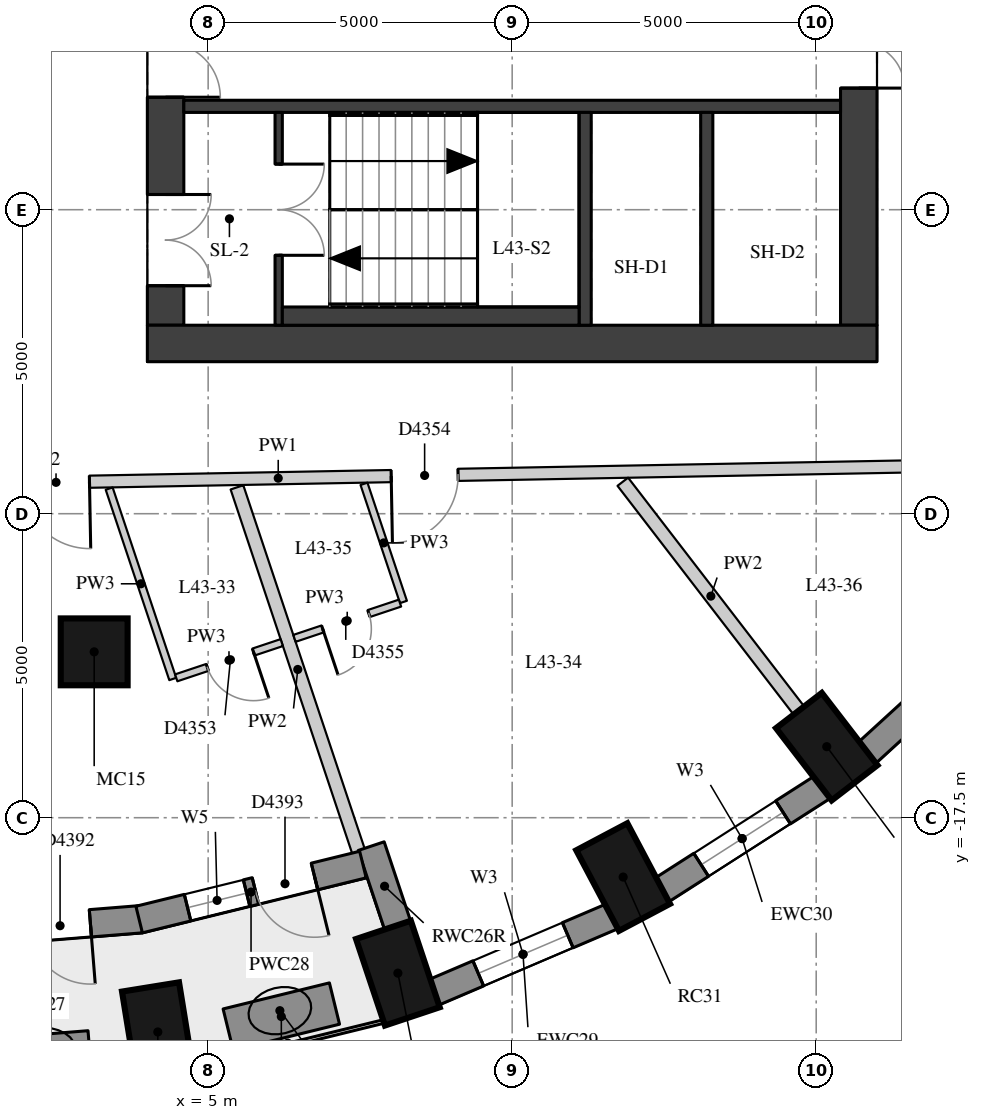
"""IFC4 building model, lengths in metres.
Left out: names, types, materials, properties, quantities, classifications, styles, units other than length and angle.
Written with IfcOpenShell. Run it as: python <this file> out.ifc"""

import sys

from ifc_helpers import new_model, si_unit, direction, frame, frame_2d, origin, origin_2d, place, context, subcontext, project, spatial, rectangle, extrude, element, fill, save


model = new_model("IFC4")
c1 = context("Model", 3, precision=1e-05, world=origin(), true_north=direction((0.0, 1.0)))
c2 = subcontext(c1, "Body", "Model", "MODEL_VIEW")
j1 = project(units=[si_unit("LENGTHUNIT", "METRE"), si_unit("PLANEANGLEUNIT", "RADIAN")], contexts=[c1])
p1 = place(None, origin())
s1 = spatial("IfcSite", under=j1, at=p1, CompositionType="ELEMENT")
p2 = place(p1, origin())
s2 = spatial("IfcBuilding", under=s1, at=p2, CompositionType="ELEMENT")
p3 = place(p2, frame((0.0, 0.0, 155.0)))
s3 = spatial("IfcBuildingStorey", under=s2, at=p3, CompositionType="ELEMENT", Elevation=155.0)
for number, where, z_axis, x_axis in (
    (1, (4.172, -21.024, 0.0), (0.0, 0.0, 1.0), (0.16, -0.987, 0.0)),
    (2, (8.12, -20.056, 0.0), (0.0, 0.0, 1.0), (0.317, -0.949, 0.0)),
    (3, (11.825, -18.476, 0.0), (0.0, 0.0, 1.0), (0.468, -0.884, 0.0)),
    (4, (15.173, -16.332, 0.0), (0.0, 0.0, 1.0), (0.61, -0.792, 0.0)),
):
    element("IfcColumn", number, at=place(p3, frame(where, z_axis=z_axis, x_axis=x_axis)), inside=s3, PredefinedType="COLUMN", context=c2, shape_type="SweptSolid", body=[
        extrude(rectangle(XDim=1.5, YDim=0.95, at=origin_2d()), origin(), (0.0, 0.0, 1.0), 3.3),
    ])
p4 = place(p3, frame((3.126, -14.772, 0.0), z_axis=(0.0, 0.0, 1.0), x_axis=(1.0, 0.0, 0.0)))
e5 = element("IfcColumn", 5, at=p4, inside=s3, PredefinedType="COLUMN", context=c2, shape_type="SweptSolid", body=[
    extrude(rectangle(XDim=1.1, YDim=1.1, at=origin_2d()), origin(), (0.0, 0.0, 1.0), 3.3),
])
p5 = place(p3, frame((8.706, -20.375, 0.0), z_axis=(0.0, 0.0, 1.0), x_axis=(0.91981046949, 0.392362969986, 0.0)))
e6 = element("IfcWall", 6, at=p5, inside=s3, PredefinedType="SOLIDWALL", context=c2, shape_type="SweptSolid", body=[
    extrude(rectangle(XDim=3.201, YDim=0.45, at=frame_2d((1.6, 0.0))), origin(), (0.0, 0.0, 1.0), 3.02),
])
p6 = place(p5, frame((0.8, 0.0, 0.4)))
e7 = element("IfcOpeningElement", 7, at=p6, cuts=e6, PredefinedType="OPENING", context=c2, shape_type="SweptSolid", body=[
    extrude(rectangle(XDim=1.6, YDim=1.75, at=frame_2d((0.8, 0.875))), frame((0.0, 0.235, 0.0), z_axis=(0.0, -1.0, 0.0), x_axis=(1.0, 0.0, 0.0)), (0.0, 0.0, 1.0), 0.47),
])
p7 = place(p3, frame((12.455, -18.693, 0.0), z_axis=(0.0, 0.0, 1.0), x_axis=(0.842065914439, 0.539374633943, 0.0)))
e8 = element("IfcWall", 8, at=p7, inside=s3, PredefinedType="SOLIDWALL", context=c2, shape_type="SweptSolid", body=[
    extrude(rectangle(XDim=3.151, YDim=0.45, at=frame_2d((1.576, 0.0))), origin(), (0.0, 0.0, 1.0), 3.02),
])
p8 = place(p7, frame((0.776, 0.0, 0.4)))
e9 = element("IfcOpeningElement", 9, at=p8, cuts=e8, PredefinedType="OPENING", context=c2, shape_type="SweptSolid", body=[
    extrude(rectangle(XDim=1.6, YDim=1.75, at=frame_2d((0.8, 0.875))), frame((0.0, 0.235, 0.0), z_axis=(0.0, -1.0, 0.0), x_axis=(1.0, 0.0, 0.0)), (0.0, 0.0, 1.0), 0.47),
])
p9 = place(p3, frame((15.83, -16.439, 0.0), z_axis=(0.0, 0.0, 1.0), x_axis=(0.737808755941, 0.675009807082, 0.0)))
e10 = element("IfcWall", 10, at=p9, inside=s3, PredefinedType="SOLIDWALL", context=c2, shape_type="SweptSolid", body=[
    extrude(rectangle(XDim=3.094, YDim=0.45, at=frame_2d((1.547, 0.0))), origin(), (0.0, 0.0, 1.0), 3.02),
])
p10 = place(p3, frame((8.122, -19.286, 0.0), z_axis=(0.0, 0.0, 1.0), x_axis=(-0.316649231286, 0.948542705589, 0.0)))
e11 = element("IfcWall", 11, at=p10, inside=s3, PredefinedType="SOLIDWALL", context=c2, shape_type="SweptSolid", body=[
    extrude(rectangle(XDim=1.39, YDim=0.45, at=frame_2d((0.695, 0.0))), origin(), (0.0, 0.0, 1.0), 3.02),
])
p11 = place(p3, frame((0.082, -19.476, 0.0), z_axis=(0.0, 0.0, 1.0), x_axis=(0.996792139022, 0.080033940204, 0.0)))
e12 = element("IfcWall", 12, at=p11, inside=s3, PredefinedType="SOLIDWALL", context=c2, shape_type="SweptSolid", body=[
    extrude(rectangle(XDim=3.831, YDim=0.45, at=frame_2d((1.916, 0.0))), origin(), (0.0, 0.0, 1.0), 3.02),
])
p12 = place(p11, frame((0.841, 0.0, 0.4)))
e13 = element("IfcOpeningElement", 13, at=p12, cuts=e12, PredefinedType="OPENING", context=c2, shape_type="SweptSolid", body=[
    extrude(rectangle(XDim=1.0, YDim=1.75, at=frame_2d((0.5, 0.875))), frame((0.0, 0.235, 0.0), z_axis=(0.0, -1.0, 0.0), x_axis=(1.0, 0.0, 0.0)), (0.0, 0.0, 1.0), 0.47),
])
p13 = place(p11, frame((1.991, 0.0, 0.0)))
e14 = element("IfcOpeningElement", 14, at=p13, cuts=e12, PredefinedType="OPENING", context=c2, shape_type="SweptSolid", body=[
    extrude(rectangle(XDim=1.0, YDim=2.15, at=frame_2d((0.5, 1.075))), frame((0.0, 0.235, 0.0), z_axis=(0.0, -1.0, 0.0), x_axis=(1.0, 0.0, 0.0)), (0.0, 0.0, 1.0), 0.47),
])
p14 = place(p3, frame((3.865, -19.175, 0.0), z_axis=(0.0, 0.0, 1.0), x_axis=(0.97109740077, 0.238683552465, 0.0)))
e15 = element("IfcWall", 15, at=p14, inside=s3, PredefinedType="SOLIDWALL", context=c2, shape_type="SweptSolid", body=[
    extrude(rectangle(XDim=3.79, YDim=0.45, at=frame_2d((1.895, 0.0))), origin(), (0.0, 0.0, 1.0), 3.02),
])
p15 = place(p14, frame((0.82, 0.0, 0.4)))
e16 = element("IfcOpeningElement", 16, at=p15, cuts=e15, PredefinedType="OPENING", context=c2, shape_type="SweptSolid", body=[
    extrude(rectangle(XDim=1.0, YDim=1.75, at=frame_2d((0.5, 0.875))), frame((0.0, 0.235, 0.0), z_axis=(0.0, -1.0, 0.0), x_axis=(1.0, 0.0, 0.0)), (0.0, 0.0, 1.0), 0.47),
])
p16 = place(p14, frame((1.97, 0.0, 0.0)))
e17 = element("IfcOpeningElement", 17, at=p16, cuts=e15, PredefinedType="OPENING", context=c2, shape_type="SweptSolid", body=[
    extrude(rectangle(XDim=1.0, YDim=2.15, at=frame_2d((0.5, 1.075))), frame((0.0, 0.235, 0.0), z_axis=(0.0, -1.0, 0.0), x_axis=(1.0, 0.0, 0.0)), (0.0, 0.0, 1.0), 0.47),
])
for number, where, z_axis, x_axis in (
    (18, (1.258, -21.496, 0.0), (0.0, 0.0, 1.0), (0.997, 0.08, 0.0)),
    (19, (5.329, -20.985, 0.0), (0.0, 0.0, 1.0), (0.971, 0.238, 0.0)),
):
    element("IfcWall", number, at=place(p3, frame(where, z_axis=z_axis, x_axis=x_axis)), inside=s3, PredefinedType="USERDEFINED", context=c2, shape_type="SweptSolid", body=[
        extrude(rectangle(XDim=1.8, YDim=0.7, at=frame_2d((0.9, 0.0))), origin(), (0.0, 0.0, 1.0), 0.75),
    ])
p17 = place(p3, frame((4.3, -9.4, 0.0), z_axis=(0.0, 0.0, 1.0), x_axis=(0.0, 1.0, 0.0)))
e20 = element("IfcWall", 20, at=p17, inside=s3, PredefinedType="SHEAR", context=c2, shape_type="SweptSolid", body=[
    extrude(rectangle(XDim=18.8, YDim=0.6, at=frame_2d((9.4, 0.0))), origin(), (0.0, 0.0, 1.0), 3.02),
])
p18 = place(p17, frame((0.65, 0.0, 0.0)))
e21 = element("IfcOpeningElement", 21, at=p18, cuts=e20, PredefinedType="OPENING", context=c2, shape_type="SweptSolid", body=[
    extrude(rectangle(XDim=1.5, YDim=2.1, at=frame_2d((0.75, 1.05))), frame((0.0, 0.31, 0.0), z_axis=(0.0, -1.0, 0.0), x_axis=(1.0, 0.0, 0.0)), (0.0, 0.0, 1.0), 0.62),
])
p19 = place(p17, frame((3.75, 0.0, 0.0)))
e22 = element("IfcOpeningElement", 22, at=p19, cuts=e20, PredefinedType="OPENING", context=c2, shape_type="SweptSolid", body=[
    extrude(rectangle(XDim=1.8, YDim=2.1, at=frame_2d((0.9, 1.05))), frame((0.0, 0.31, 0.0), z_axis=(0.0, -1.0, 0.0), x_axis=(1.0, 0.0, 0.0)), (0.0, 0.0, 1.0), 0.62),
])
p20 = place(p17, frame((6.25, 0.0, 0.0)))
e23 = element("IfcOpeningElement", 23, at=p20, cuts=e20, PredefinedType="OPENING", context=c2, shape_type="SweptSolid", body=[
    extrude(rectangle(XDim=1.1, YDim=2.1, at=frame_2d((0.55, 1.05))), frame((0.0, 0.31, 0.0), z_axis=(0.0, -1.0, 0.0), x_axis=(1.0, 0.0, 0.0)), (0.0, 0.0, 1.0), 0.62),
])
p21 = place(p17, frame((8.9, 0.0, 0.0)))
e24 = element("IfcOpeningElement", 24, at=p21, cuts=e20, PredefinedType="OPENING", context=c2, shape_type="SweptSolid", body=[
    extrude(rectangle(XDim=1.0, YDim=2.1, at=frame_2d((0.5, 1.05))), frame((0.0, 0.31, 0.0), z_axis=(0.0, -1.0, 0.0), x_axis=(1.0, 0.0, 0.0)), (0.0, 0.0, 1.0), 0.62),
])
p22 = place(p17, frame((11.45, 0.0, 0.0)))
e25 = element("IfcOpeningElement", 25, at=p22, cuts=e20, PredefinedType="OPENING", context=c2, shape_type="SweptSolid", body=[
    extrude(rectangle(XDim=1.1, YDim=2.1, at=frame_2d((0.55, 1.05))), frame((0.0, 0.31, 0.0), z_axis=(0.0, -1.0, 0.0), x_axis=(1.0, 0.0, 0.0)), (0.0, 0.0, 1.0), 0.62),
])
p23 = place(p17, frame((13.25, 0.0, 0.0)))
e26 = element("IfcOpeningElement", 26, at=p23, cuts=e20, PredefinedType="OPENING", context=c2, shape_type="SweptSolid", body=[
    extrude(rectangle(XDim=1.8, YDim=2.1, at=frame_2d((0.9, 1.05))), frame((0.0, 0.31, 0.0), z_axis=(0.0, -1.0, 0.0), x_axis=(1.0, 0.0, 0.0)), (0.0, 0.0, 1.0), 0.62),
])
p24 = place(p17, frame((16.65, 0.0, 0.0)))
e27 = element("IfcOpeningElement", 27, at=p24, cuts=e20, PredefinedType="OPENING", context=c2, shape_type="SweptSolid", body=[
    extrude(rectangle(XDim=1.5, YDim=2.1, at=frame_2d((0.75, 1.05))), frame((0.0, 0.31, 0.0), z_axis=(0.0, -1.0, 0.0), x_axis=(1.0, 0.0, 0.0)), (0.0, 0.0, 1.0), 0.62),
])
p25 = place(p3, frame((15.7, -9.4, 0.0), z_axis=(0.0, 0.0, 1.0), x_axis=(0.0, 1.0, 0.0)))
e28 = element("IfcWall", 28, at=p25, inside=s3, PredefinedType="SHEAR", context=c2, shape_type="SweptSolid", body=[
    extrude(rectangle(XDim=18.8, YDim=0.6, at=frame_2d((9.4, 0.0))), origin(), (0.0, 0.0, 1.0), 3.02),
])
p26 = place(p25, frame((13.4, 0.0, 0.0)))
e29 = element("IfcOpeningElement", 29, at=p26, cuts=e28, PredefinedType="OPENING", context=c2, shape_type="SweptSolid", body=[
    extrude(rectangle(XDim=1.5, YDim=2.1, at=frame_2d((0.75, 1.05))), frame((0.0, 0.31, 0.0), z_axis=(0.0, -1.0, 0.0), x_axis=(1.0, 0.0, 0.0)), (0.0, 0.0, 1.0), 0.62),
])
p27 = place(p25, frame((3.9, 0.0, 0.0)))
e30 = element("IfcOpeningElement", 30, at=p27, cuts=e28, PredefinedType="OPENING", context=c2, shape_type="SweptSolid", body=[
    extrude(rectangle(XDim=1.5, YDim=2.1, at=frame_2d((0.75, 1.05))), frame((0.0, 0.31, 0.0), z_axis=(0.0, -1.0, 0.0), x_axis=(1.0, 0.0, 0.0)), (0.0, 0.0, 1.0), 0.62),
])
p28 = place(p3, frame((4.0, -9.7, 0.0), z_axis=(0.0, 0.0, 1.0), x_axis=(1.0, 0.0, 0.0)))
e31 = element("IfcWall", 31, at=p28, inside=s3, PredefinedType="SHEAR", context=c2, shape_type="SweptSolid", body=[
    extrude(rectangle(XDim=12.0, YDim=0.6, at=frame_2d((6.0, 0.0))), origin(), (0.0, 0.0, 1.0), 3.02),
])
p29 = place(p3, frame((4.6, -5.8, 0.0), z_axis=(0.0, 0.0, 1.0), x_axis=(1.0, 0.0, 0.0)))
e32 = element("IfcWall", 32, at=p29, inside=s3, PredefinedType="SHEAR", context=c2, shape_type="SweptSolid", body=[
    extrude(rectangle(XDim=10.8, YDim=0.2, at=frame_2d((5.4, 0.0))), origin(), (0.0, 0.0, 1.0), 3.02),
])
for number, where, z_axis, x_axis in (
    (33, (11.2, -9.4, 0.0), (0.0, 0.0, 1.0), (0.0, 1.0, 0.0)),
    (34, (13.2, -9.4, 0.0), (0.0, 0.0, 1.0), (0.0, 1.0, 0.0)),
):
    element("IfcWall", number, at=place(p3, frame(where, z_axis=z_axis, x_axis=x_axis)), inside=s3, PredefinedType="SHEAR", context=c2, shape_type="SweptSolid", body=[
        extrude(rectangle(XDim=3.5, YDim=0.2, at=frame_2d((1.75, 0.0))), origin(), (0.0, 0.0, 1.0), 3.02),
    ])
p30 = place(p3, frame((6.16, -9.4, 0.0), z_axis=(0.0, 0.0, 1.0), x_axis=(0.0, 1.0, 0.0)))
e35 = element("IfcWall", 35, at=p30, inside=s3, PredefinedType="SHEAR", context=c2, shape_type="SweptSolid", body=[
    extrude(rectangle(XDim=3.5, YDim=0.12, at=frame_2d((1.75, 0.0))), origin(), (0.0, 0.0, 1.0), 3.02),
])
p31 = place(p30, frame((1.15, 0.0, 0.0)))
e36 = element("IfcOpeningElement", 36, at=p31, cuts=e35, PredefinedType="OPENING", context=c2, shape_type="SweptSolid", body=[
    extrude(rectangle(XDim=1.5, YDim=2.1, at=frame_2d((0.75, 1.05))), frame((0.0, 0.07, 0.0), z_axis=(0.0, -1.0, 0.0), x_axis=(1.0, 0.0, 0.0)), (0.0, 0.0, 1.0), 0.14),
])
p32 = place(p3, frame((6.22, -9.25, 0.0), z_axis=(0.0, 0.0, 1.0), x_axis=(1.0, 0.0, 0.0)))
e37 = element("IfcWall", 37, at=p32, inside=s3, PredefinedType="PARTITIONING", context=c2, shape_type="SweptSolid", body=[
    extrude(rectangle(XDim=4.88, YDim=0.3, at=frame_2d((2.44, 0.0))), origin(), (0.0, 0.0, 1.0), 3.02),
])
p33 = place(p3, frame((17.6, -11.702, 0.0), z_axis=(0.0, 0.0, 1.0), x_axis=(-0.999825923551, -0.018658043723, 0.0)))
e38 = element("IfcWall", 38, at=p33, inside=s3, PredefinedType="PARTITIONING", context=c2, shape_type="SweptSolid", body=[
    extrude(rectangle(XDim=22.899, YDim=0.2, at=frame_2d((11.449, 0.0))), origin(), (0.0, 0.0, 1.0), 3.02),
])
p34 = place(p33, frame((20.729, 0.0, 0.0)))
e39 = element("IfcOpeningElement", 39, at=p34, cuts=e38, PredefinedType="OPENING", context=c2, shape_type="SweptSolid", body=[
    extrude(rectangle(XDim=1.8, YDim=2.1, at=frame_2d((0.9, 1.05))), frame((0.0, 0.11, 0.0), z_axis=(0.0, -1.0, 0.0), x_axis=(1.0, 0.0, 0.0)), (0.0, 0.0, 1.0), 0.22),
])
p35 = place(p33, frame((14.554, 0.0, 0.0)))
e40 = element("IfcOpeningElement", 40, at=p35, cuts=e38, PredefinedType="OPENING", context=c2, shape_type="SweptSolid", body=[
    extrude(rectangle(XDim=1.1, YDim=2.1, at=frame_2d((0.55, 1.05))), frame((0.0, 0.11, 0.0), z_axis=(0.0, -1.0, 0.0), x_axis=(1.0, 0.0, 0.0)), (0.0, 0.0, 1.0), 0.22),
])
p36 = place(p33, frame((8.491, 0.0, 0.0)))
e41 = element("IfcOpeningElement", 41, at=p36, cuts=e38, PredefinedType="OPENING", context=c2, shape_type="SweptSolid", body=[
    extrude(rectangle(XDim=1.1, YDim=2.1, at=frame_2d((0.55, 1.05))), frame((0.0, 0.11, 0.0), z_axis=(0.0, -1.0, 0.0), x_axis=(1.0, 0.0, 0.0)), (0.0, 0.0, 1.0), 0.22),
])
p37 = place(p3, frame((7.474, -18.056, 0.0), z_axis=(0.0, 0.0, 1.0), x_axis=(-0.316714858998, 0.948520794759, 0.0)))
e42 = element("IfcWall", 42, at=p37, inside=s3, PredefinedType="PARTITIONING", context=c2, shape_type="SweptSolid", body=[
    extrude(rectangle(XDim=6.315, YDim=0.22, at=frame_2d((3.157, 0.0))), origin(), (0.0, 0.0, 1.0), 3.02),
])
p38 = place(p3, frame((14.716, -15.737, 0.0), z_axis=(0.0, 0.0, 1.0), x_axis=(-0.609964163419, 0.79242899956, 0.0)))
e43 = element("IfcWall", 43, at=p38, inside=s3, PredefinedType="PARTITIONING", context=c2, shape_type="SweptSolid", body=[
    extrude(rectangle(XDim=4.749, YDim=0.22, at=frame_2d((2.374, 0.0))), origin(), (0.0, 0.0, 1.0), 3.02),
])
p39 = place(p3, frame((3.372, -12.087, 0.0), z_axis=(0.0, 0.0, 1.0), x_axis=(0.316715775564, -0.948520488713, 0.0)))
e44 = element("IfcWall", 44, at=p39, inside=s3, PredefinedType="PARTITIONING", context=c2, shape_type="SweptSolid", body=[
    extrude(rectangle(XDim=3.302, YDim=0.12, at=frame_2d((1.651, 0.0))), origin(), (0.0, 0.0, 1.0), 3.02),
])
p40 = place(p3, frame((7.563, -12.009, 0.0), z_axis=(0.0, 0.0, 1.0), x_axis=(0.316763997654, -0.948504385752, 0.0)))
e45 = element("IfcWall", 45, at=p40, inside=s3, PredefinedType="PARTITIONING", context=c2, shape_type="SweptSolid", body=[
    extrude(rectangle(XDim=2.049, YDim=0.12, at=frame_2d((1.024, 0.0))), origin(), (0.0, 0.0, 1.0), 3.02),
])
p41 = place(p3, frame((4.475, -15.199, 0.0), z_axis=(0.0, 0.0, 1.0), x_axis=(0.948549784176, 0.316628026143, 0.0)))
e46 = element("IfcWall", 46, at=p41, inside=s3, PredefinedType="PARTITIONING", context=c2, shape_type="SweptSolid", body=[
    extrude(rectangle(XDim=1.83, YDim=0.12, at=frame_2d((0.915, 0.0))), origin(), (0.0, 0.0, 1.0), 3.02),
])
p42 = place(p41, frame((0.54, 0.0, 0.0)))
e47 = element("IfcOpeningElement", 47, at=p42, cuts=e46, PredefinedType="OPENING", context=c2, shape_type="SweptSolid", body=[
    extrude(rectangle(XDim=0.8, YDim=2.1, at=frame_2d((0.4, 1.05))), frame((0.0, 0.07, 0.0), z_axis=(0.0, -1.0, 0.0), x_axis=(1.0, 0.0, 0.0)), (0.0, 0.0, 1.0), 0.14),
])
p43 = place(p3, frame((8.155, -13.971, 0.0), z_axis=(0.0, 0.0, 1.0), x_axis=(-0.9485230882, -0.31670799035, 0.0)))
e48 = element("IfcWall", 48, at=p43, inside=s3, PredefinedType="PARTITIONING", context=c2, shape_type="SweptSolid", body=[
    extrude(rectangle(XDim=1.83, YDim=0.12, at=frame_2d((0.915, 0.0))), origin(), (0.0, 0.0, 1.0), 3.02),
])
p44 = place(p43, frame((0.54, 0.0, 0.0)))
e49 = element("IfcOpeningElement", 49, at=p44, cuts=e48, PredefinedType="OPENING", context=c2, shape_type="SweptSolid", body=[
    extrude(rectangle(XDim=0.8, YDim=2.1, at=frame_2d((0.4, 1.05))), frame((0.0, 0.07, 0.0), z_axis=(0.0, -1.0, 0.0), x_axis=(1.0, 0.0, 0.0)), (0.0, 0.0, 1.0), 0.14),
])
p45 = place(p6, origin())
e50 = element("IfcWindow", 50, at=p45, inside=s3, PartitioningType="SINGLE_PANEL", PredefinedType="WINDOW", context=c2, shape_type="SweptSolid", body=[
    extrude(rectangle(XDim=1.6, YDim=1.75, at=frame_2d((0.8, 0.875))), frame((0.0, 0.035, 0.0), z_axis=(0.0, -1.0, 0.0), x_axis=(1.0, 0.0, 0.0)), (0.0, 0.0, 1.0), 0.06),
])
fill(e7, e50)
p46 = place(p8, origin())
e51 = element("IfcWindow", 51, at=p46, inside=s3, PartitioningType="SINGLE_PANEL", PredefinedType="WINDOW", context=c2, shape_type="SweptSolid", body=[
    extrude(rectangle(XDim=1.6, YDim=1.75, at=frame_2d((0.8, 0.875))), frame((0.0, 0.035, 0.0), z_axis=(0.0, -1.0, 0.0), x_axis=(1.0, 0.0, 0.0)), (0.0, 0.0, 1.0), 0.06),
])
fill(e9, e51)
p47 = place(p13, frame((1.0, 0.0, 0.0), z_axis=(0.0, 0.0, 1.0), x_axis=(-1.0, 0.0, 0.0)))
e52 = element("IfcDoor", 52, at=p47, inside=s3, OperationType="SINGLE_SWING_LEFT", PredefinedType="DOOR", context=c2, shape_type="SweptSolid", body=[
    extrude(rectangle(XDim=1.0, YDim=2.15, at=frame_2d((0.5, 1.075))), frame((0.0, 0.075, 0.0), z_axis=(0.0, -1.0, 0.0), x_axis=(1.0, 0.0, 0.0)), (0.0, 0.0, 1.0), 0.05),
])
fill(e14, e52)
p48 = place(p15, origin())
e53 = element("IfcWindow", 53, at=p48, inside=s3, PartitioningType="SINGLE_PANEL", PredefinedType="WINDOW", context=c2, shape_type="SweptSolid", body=[
    extrude(rectangle(XDim=1.0, YDim=1.75, at=frame_2d((0.5, 0.875))), frame((0.0, 0.035, 0.0), z_axis=(0.0, -1.0, 0.0), x_axis=(1.0, 0.0, 0.0)), (0.0, 0.0, 1.0), 0.06),
])
fill(e16, e53)
p49 = place(p16, frame((1.0, 0.0, 0.0), z_axis=(0.0, 0.0, 1.0), x_axis=(-1.0, 0.0, 0.0)))
e54 = element("IfcDoor", 54, at=p49, inside=s3, OperationType="SINGLE_SWING_LEFT", PredefinedType="DOOR", context=c2, shape_type="SweptSolid", body=[
    extrude(rectangle(XDim=1.0, YDim=2.15, at=frame_2d((0.5, 1.075))), frame((0.0, 0.075, 0.0), z_axis=(0.0, -1.0, 0.0), x_axis=(1.0, 0.0, 0.0)), (0.0, 0.0, 1.0), 0.05),
])
fill(e17, e54)
p50 = place(p18, origin())
e55 = element("IfcDoor", 55, at=p50, inside=s3, OperationType="DOUBLE_DOOR_SINGLE_SWING", PredefinedType="DOOR", context=c2, shape_type="SweptSolid", body=[
    extrude(rectangle(XDim=1.5, YDim=2.1, at=frame_2d((0.75, 1.05))), frame((0.0, 0.025, 0.0), z_axis=(0.0, -1.0, 0.0), x_axis=(1.0, 0.0, 0.0)), (0.0, 0.0, 1.0), 0.05),
])
fill(e21, e55)
p51 = place(p19, origin())
e56 = element("IfcDoor", 56, at=p51, inside=s3, OperationType="DOUBLE_DOOR_SINGLE_SWING", PredefinedType="DOOR", context=c2, shape_type="SweptSolid", body=[
    extrude(rectangle(XDim=1.8, YDim=2.1, at=frame_2d((0.9, 1.05))), frame((0.0, 0.025, 0.0), z_axis=(0.0, -1.0, 0.0), x_axis=(1.0, 0.0, 0.0)), (0.0, 0.0, 1.0), 0.05),
])
fill(e22, e56)
p52 = place(p27, origin())
e57 = element("IfcDoor", 57, at=p52, inside=s3, OperationType="DOUBLE_DOOR_SINGLE_SWING", PredefinedType="DOOR", context=c2, shape_type="SweptSolid", body=[
    extrude(rectangle(XDim=1.5, YDim=2.1, at=frame_2d((0.75, 1.05))), frame((0.0, 0.025, 0.0), z_axis=(0.0, -1.0, 0.0), x_axis=(1.0, 0.0, 0.0)), (0.0, 0.0, 1.0), 0.05),
])
fill(e30, e57)
p53 = place(p31, origin())
e58 = element("IfcDoor", 58, at=p53, inside=s3, OperationType="DOUBLE_DOOR_SINGLE_SWING", PredefinedType="DOOR", context=c2, shape_type="SweptSolid", body=[
    extrude(rectangle(XDim=1.5, YDim=2.1, at=frame_2d((0.75, 1.05))), frame((0.0, 0.025, 0.0), z_axis=(0.0, -1.0, 0.0), x_axis=(1.0, 0.0, 0.0)), (0.0, 0.0, 1.0), 0.05),
])
fill(e36, e58)
p54 = place(p35, origin())
e59 = element("IfcDoor", 59, at=p54, inside=s3, OperationType="SINGLE_SWING_LEFT", PredefinedType="DOOR", context=c2, shape_type="SweptSolid", body=[
    extrude(rectangle(XDim=1.1, YDim=2.1, at=frame_2d((0.55, 1.05))), frame((0.0, 0.025, 0.0), z_axis=(0.0, -1.0, 0.0), x_axis=(1.0, 0.0, 0.0)), (0.0, 0.0, 1.0), 0.05),
])
fill(e40, e59)
p55 = place(p42, origin())
e60 = element("IfcDoor", 60, at=p55, inside=s3, OperationType="SINGLE_SWING_LEFT", PredefinedType="DOOR", context=c2, shape_type="SweptSolid", body=[
    extrude(rectangle(XDim=0.8, YDim=2.1, at=frame_2d((0.4, 1.05))), frame((0.0, 0.025, 0.0), z_axis=(0.0, -1.0, 0.0), x_axis=(1.0, 0.0, 0.0)), (0.0, 0.0, 1.0), 0.05),
])
fill(e47, e60)
p56 = place(p36, origin())
e61 = element("IfcDoor", 61, at=p56, inside=s3, OperationType="SINGLE_SWING_RIGHT", PredefinedType="DOOR", context=c2, shape_type="SweptSolid", body=[
    extrude(rectangle(XDim=1.1, YDim=2.1, at=frame_2d((0.55, 1.05))), frame((0.0, 0.025, 0.0), z_axis=(0.0, -1.0, 0.0), x_axis=(1.0, 0.0, 0.0)), (0.0, 0.0, 1.0), 0.05),
])
fill(e41, e61)
p57 = place(p44, origin())
e62 = element("IfcDoor", 62, at=p57, inside=s3, OperationType="SINGLE_SWING_RIGHT", PredefinedType="DOOR", context=c2, shape_type="SweptSolid", body=[
    extrude(rectangle(XDim=0.8, YDim=2.1, at=frame_2d((0.4, 1.05))), frame((0.0, 0.025, 0.0), z_axis=(0.0, -1.0, 0.0), x_axis=(1.0, 0.0, 0.0)), (0.0, 0.0, 1.0), 0.05),
])
fill(e49, e62)
save(model, sys.argv[1])
